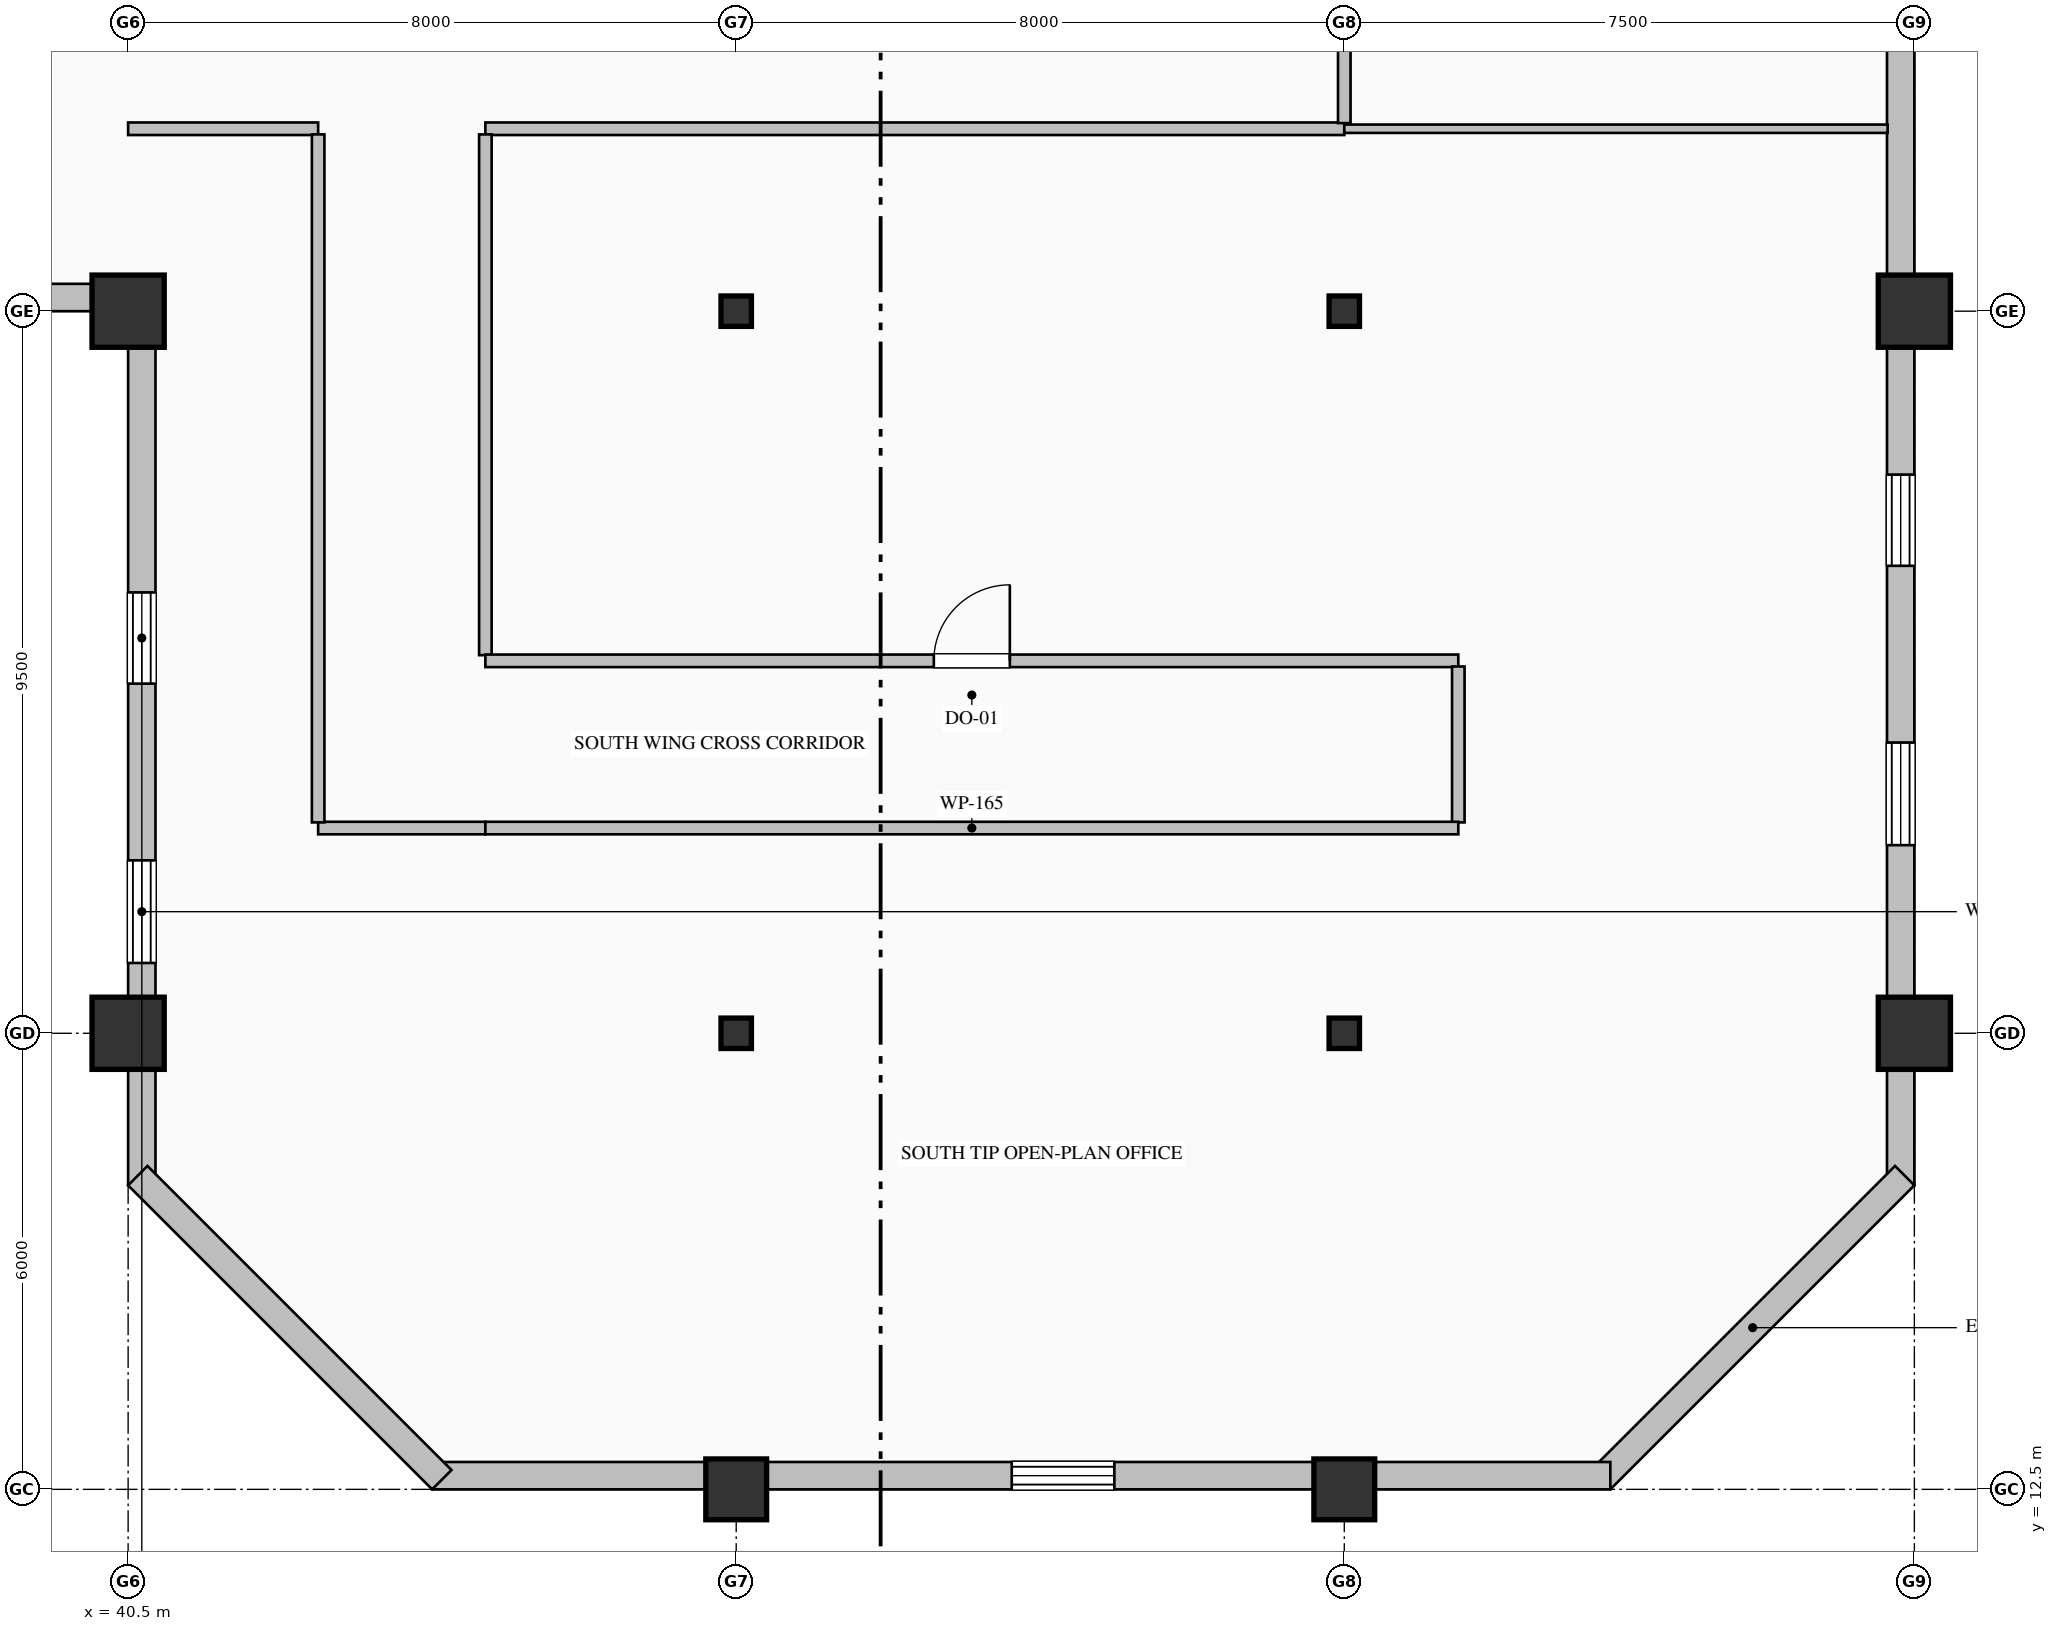
"""IFC4 building model, lengths in metres.
Left out: names, types, materials, properties, quantities, classifications, styles, units other than length and angle.
Written with IfcOpenShell. Run it as: python <this file> out.ifc"""

import sys

from ifc_helpers import new_model, si_unit, direction, frame, frame_2d, origin, origin_2d, place, context, subcontext, project, spatial, rectangle, hollow_rectangle, i_section, extrude, element, fill, save


model = new_model("IFC4")
c1 = context("Model", 3, precision=1e-05, world=origin(), true_north=direction((0.0, 1.0)))
c2 = subcontext(c1, "Body", "Model", "MODEL_VIEW")
j1 = project(units=[si_unit("LENGTHUNIT", "METRE"), si_unit("PLANEANGLEUNIT", "RADIAN")], contexts=[c1])
p1 = place(None, origin())
s1 = spatial("IfcSite", under=j1, at=p1, CompositionType="ELEMENT")
p2 = place(p1, origin())
s2 = spatial("IfcBuilding", under=s1, at=p2, CompositionType="ELEMENT")
p3 = place(p2, frame((0.0, 0.0, 253.8)))
s3 = spatial("IfcBuildingStorey", under=s2, at=p3, CompositionType="ELEMENT", Elevation=253.8)
for number, where, z_axis, x_axis in (
    (1, (40.5, 18.5, 0.0), (0.0, 0.0, 1.0), (1.0, 0.0, 0.0)),
    (2, (40.5, 28.0, 0.0), (0.0, 0.0, 1.0), (1.0, 0.0, 0.0)),
):
    element("IfcColumn", number, at=place(p3, frame(where, z_axis=z_axis, x_axis=x_axis)), inside=s3, PredefinedType="COLUMN", context=c2, shape_type="SweptSolid", body=[
        extrude(hollow_rectangle(XDim=0.95, YDim=0.95, WallThickness=0.036, at=origin_2d()), origin(), (0.0, 0.0, 1.0), 4.0),
    ])
p4 = place(p3, frame((48.5, 12.5, 0.0), z_axis=(0.0, 0.0, 1.0), x_axis=(1.0, 0.0, 0.0)))
e3 = element("IfcColumn", 3, at=p4, inside=s3, PredefinedType="COLUMN", context=c2, shape_type="SweptSolid", body=[
    extrude(hollow_rectangle(XDim=0.8, YDim=0.8, WallThickness=0.032, at=origin_2d()), origin(), (0.0, 0.0, 1.0), 4.0),
])
for number, where, z_axis, x_axis in (
    (4, (48.5, 18.5, 0.0), (0.0, 0.0, 1.0), (1.0, 0.0, 0.0)),
    (5, (48.5, 28.0, 0.0), (0.0, 0.0, 1.0), (1.0, 0.0, 0.0)),
):
    element("IfcColumn", number, at=place(p3, frame(where, z_axis=z_axis, x_axis=x_axis)), inside=s3, PredefinedType="COLUMN", context=c2, shape_type="SweptSolid", body=[
        extrude(i_section(OverallWidth=0.4, OverallDepth=0.4, WebThickness=0.013, FlangeThickness=0.021, FilletRadius=0.022, at=origin_2d()), origin(), (0.0, 0.0, 1.0), 4.0),
    ])
p5 = place(p3, frame((56.5, 12.5, 0.0), z_axis=(0.0, 0.0, 1.0), x_axis=(1.0, 0.0, 0.0)))
e6 = element("IfcColumn", 6, at=p5, inside=s3, PredefinedType="COLUMN", context=c2, shape_type="SweptSolid", body=[
    extrude(hollow_rectangle(XDim=0.8, YDim=0.8, WallThickness=0.032, at=origin_2d()), origin(), (0.0, 0.0, 1.0), 4.0),
])
for number, where, z_axis, x_axis in (
    (7, (56.5, 18.5, 0.0), (0.0, 0.0, 1.0), (1.0, 0.0, 0.0)),
    (8, (56.5, 28.0, 0.0), (0.0, 0.0, 1.0), (1.0, 0.0, 0.0)),
):
    element("IfcColumn", number, at=place(p3, frame(where, z_axis=z_axis, x_axis=x_axis)), inside=s3, PredefinedType="COLUMN", context=c2, shape_type="SweptSolid", body=[
        extrude(i_section(OverallWidth=0.4, OverallDepth=0.4, WebThickness=0.013, FlangeThickness=0.021, FilletRadius=0.022, at=origin_2d()), origin(), (0.0, 0.0, 1.0), 4.0),
    ])
for number, where, z_axis, x_axis in (
    (9, (64.0, 18.5, 0.0), (0.0, 0.0, 1.0), (1.0, 0.0, 0.0)),
    (10, (64.0, 28.0, 0.0), (0.0, 0.0, 1.0), (1.0, 0.0, 0.0)),
):
    element("IfcColumn", number, at=place(p3, frame(where, z_axis=z_axis, x_axis=x_axis)), inside=s3, PredefinedType="COLUMN", context=c2, shape_type="SweptSolid", body=[
        extrude(hollow_rectangle(XDim=0.95, YDim=0.95, WallThickness=0.036, at=origin_2d()), origin(), (0.0, 0.0, 1.0), 4.0),
    ])
p6 = place(p3, frame((40.68, 16.5, 0.0), z_axis=(0.0, 0.0, 1.0), x_axis=(0.0, 1.0, 0.0)))
e11 = element("IfcWall", 11, at=p6, inside=s3, PredefinedType="SOLIDWALL", context=c2, shape_type="SweptSolid", body=[
    extrude(rectangle(XDim=11.86, YDim=0.36, at=frame_2d((5.93, 0.0))), origin(), (0.0, 0.0, 1.0), 3.187),
])
p7 = place(p6, frame((2.925, 0.0, 0.9)))
e12 = element("IfcOpeningElement", 12, at=p7, cuts=e11, PredefinedType="OPENING", context=c2, shape_type="SweptSolid", body=[
    extrude(rectangle(XDim=1.35, YDim=1.85, at=frame_2d((0.675, 0.925))), frame((0.0, 0.19, 0.0), z_axis=(0.0, -1.0, 0.0), x_axis=(1.0, 0.0, 0.0)), (0.0, 0.0, 1.0), 0.38),
])
p8 = place(p6, frame((6.6, 0.0, 0.7)))
e13 = element("IfcOpeningElement", 13, at=p8, cuts=e11, PredefinedType="OPENING", context=c2, shape_type="SweptSolid", body=[
    extrude(rectangle(XDim=1.2, YDim=1.85, at=frame_2d((0.6, 0.925))), frame((0.0, 0.19, 0.0), z_axis=(0.0, -1.0, 0.0), x_axis=(1.0, 0.0, 0.0)), (0.0, 0.0, 1.0), 0.38),
])
p9 = place(p3, frame((40.52, 28.18, 0.0), z_axis=(0.0, 0.0, 1.0), x_axis=(-1.0, 0.0, 0.0)))
e14 = element("IfcWall", 14, at=p9, inside=s3, PredefinedType="SOLIDWALL", context=c2, shape_type="SweptSolid", body=[
    extrude(rectangle(XDim=27.52, YDim=0.36, at=frame_2d((13.76, 0.0))), origin(), (0.0, 0.0, 1.0), 3.187),
])
p10 = place(p9, frame((10.125, 0.0, 0.9)))
e15 = element("IfcOpeningElement", 15, at=p10, cuts=e14, PredefinedType="OPENING", context=c2, shape_type="SweptSolid", body=[
    extrude(rectangle(XDim=1.35, YDim=1.85, at=frame_2d((0.675, 0.925))), frame((0.0, 0.19, 0.0), z_axis=(0.0, -1.0, 0.0), x_axis=(1.0, 0.0, 0.0)), (0.0, 0.0, 1.0), 0.38),
])
p11 = place(p9, frame((13.8, 0.0, 0.7)))
e16 = element("IfcOpeningElement", 16, at=p11, cuts=e14, PredefinedType="OPENING", context=c2, shape_type="SweptSolid", body=[
    extrude(rectangle(XDim=1.2, YDim=1.85, at=frame_2d((0.6, 0.925))), frame((0.0, 0.19, 0.0), z_axis=(0.0, -1.0, 0.0), x_axis=(1.0, 0.0, 0.0)), (0.0, 0.0, 1.0), 0.38),
])
p12 = place(p9, frame((17.4, 0.0, 0.9)))
e17 = element("IfcOpeningElement", 17, at=p12, cuts=e14, PredefinedType="OPENING", context=c2, shape_type="SweptSolid", body=[
    extrude(rectangle(XDim=1.2, YDim=1.85, at=frame_2d((0.6, 0.925))), frame((0.0, 0.19, 0.0), z_axis=(0.0, -1.0, 0.0), x_axis=(1.0, 0.0, 0.0)), (0.0, 0.0, 1.0), 0.38),
])
p13 = place(p9, frame((20.925, 0.0, 0.9)))
e18 = element("IfcOpeningElement", 18, at=p13, cuts=e14, PredefinedType="OPENING", context=c2, shape_type="SweptSolid", body=[
    extrude(rectangle(XDim=1.35, YDim=1.85, at=frame_2d((0.675, 0.925))), frame((0.0, 0.19, 0.0), z_axis=(0.0, -1.0, 0.0), x_axis=(1.0, 0.0, 0.0)), (0.0, 0.0, 1.0), 0.38),
])
p14 = place(p3, frame((63.82, 36.05, 0.0), z_axis=(0.0, 0.0, 1.0), x_axis=(0.0, -1.0, 0.0)))
e19 = element("IfcWall", 19, at=p14, inside=s3, PredefinedType="SOLIDWALL", context=c2, shape_type="SweptSolid", body=[
    extrude(rectangle(XDim=19.55, YDim=0.36, at=frame_2d((9.775, 0.0))), origin(), (0.0, 0.0, 1.0), 3.325),
])
p15 = place(p14, frame((2.925, 0.0, 0.9)))
e20 = element("IfcOpeningElement", 20, at=p15, cuts=e19, PredefinedType="OPENING", context=c2, shape_type="SweptSolid", body=[
    extrude(rectangle(XDim=1.35, YDim=1.85, at=frame_2d((0.675, 0.925))), frame((0.0, 0.19, 0.0), z_axis=(0.0, -1.0, 0.0), x_axis=(1.0, 0.0, 0.0)), (0.0, 0.0, 1.0), 0.38),
])
p16 = place(p14, frame((10.2, 0.0, 0.9)))
e21 = element("IfcOpeningElement", 21, at=p16, cuts=e19, PredefinedType="OPENING", context=c2, shape_type="SweptSolid", body=[
    extrude(rectangle(XDim=1.2, YDim=1.85, at=frame_2d((0.6, 0.925))), frame((0.0, 0.19, 0.0), z_axis=(0.0, -1.0, 0.0), x_axis=(1.0, 0.0, 0.0)), (0.0, 0.0, 1.0), 0.38),
])
p17 = place(p14, frame((13.725, 0.0, 0.9)))
e22 = element("IfcOpeningElement", 22, at=p17, cuts=e19, PredefinedType="OPENING", context=c2, shape_type="SweptSolid", body=[
    extrude(rectangle(XDim=1.35, YDim=1.85, at=frame_2d((0.675, 0.925))), frame((0.0, 0.19, 0.0), z_axis=(0.0, -1.0, 0.0), x_axis=(1.0, 0.0, 0.0)), (0.0, 0.0, 1.0), 0.38),
])
p18 = place(p3, frame((63.873, 16.627, 0.0), z_axis=(0.0, 0.0, 1.0), x_axis=(-0.707106781187, -0.707106781187, 0.0)))
e23 = element("IfcWall", 23, at=p18, inside=s3, PredefinedType="SOLIDWALL", context=c2, shape_type="SweptSolid", body=[
    extrude(rectangle(XDim=5.657, YDim=0.36, at=frame_2d((2.828, 0.0))), origin(), (0.0, 0.0, 1.0), 3.775),
])
p19 = place(p3, frame((60.0, 12.68, 0.0), z_axis=(0.0, 0.0, 1.0), x_axis=(-1.0, 0.0, 0.0)))
e24 = element("IfcWall", 24, at=p19, inside=s3, PredefinedType="SOLIDWALL", context=c2, shape_type="SweptSolid", body=[
    extrude(rectangle(XDim=15.5, YDim=0.36, at=frame_2d((7.75, 0.0))), origin(), (0.0, 0.0, 1.0), 3.325),
])
p20 = place(p19, frame((6.525, 0.0, 0.9)))
e25 = element("IfcOpeningElement", 25, at=p20, cuts=e24, PredefinedType="OPENING", context=c2, shape_type="SweptSolid", body=[
    extrude(rectangle(XDim=1.35, YDim=1.85, at=frame_2d((0.675, 0.925))), frame((0.0, 0.19, 0.0), z_axis=(0.0, -1.0, 0.0), x_axis=(1.0, 0.0, 0.0)), (0.0, 0.0, 1.0), 0.38),
])
p21 = place(p3, frame((44.627, 12.627, 0.0), z_axis=(0.0, 0.0, 1.0), x_axis=(-0.707106781187, 0.707106781187, 0.0)))
e26 = element("IfcWall", 26, at=p21, inside=s3, PredefinedType="SOLIDWALL", context=c2, shape_type="SweptSolid", body=[
    extrude(rectangle(XDim=5.657, YDim=0.36, at=frame_2d((2.828, 0.0))), origin(), (0.0, 0.0, 1.0), 3.775),
])
p22 = place(p3, frame((43.0, 30.4, 0.0), z_axis=(0.0, 0.0, 1.0), x_axis=(-1.0, 0.0, 0.0)))
e27 = element("IfcWall", 27, at=p22, inside=s3, PredefinedType="PARTITIONING", context=c2, shape_type="SweptSolid", body=[
    extrude(rectangle(XDim=2.5, YDim=0.165, at=frame_2d((1.25, 0.0))), origin(), (0.0, 0.0, 1.0), 3.775),
])
p23 = place(p3, frame((56.5, 30.4, 0.0), z_axis=(0.0, 0.0, 1.0), x_axis=(-1.0, 0.0, 0.0)))
e28 = element("IfcWall", 28, at=p23, inside=s3, PredefinedType="PARTITIONING", context=c2, shape_type="SweptSolid", body=[
    extrude(rectangle(XDim=11.3, YDim=0.165, at=frame_2d((5.65, 0.0))), origin(), (0.0, 0.0, 1.0), 3.775),
])
p24 = place(p3, frame((56.5, 36.0, 0.0), z_axis=(0.0, 0.0, 1.0), x_axis=(0.0, -1.0, 0.0)))
e29 = element("IfcWall", 29, at=p24, inside=s3, PredefinedType="PARTITIONING", context=c2, shape_type="SweptSolid", body=[
    extrude(rectangle(XDim=5.525, YDim=0.165, at=frame_2d((2.763, 0.0))), origin(), (0.0, 0.0, 1.0), 3.179),
])
p25 = place(p24, frame((2.263, 0.0, 0.0)))
e30 = element("IfcOpeningElement", 30, at=p25, cuts=e29, PredefinedType="OPENING", context=c2, shape_type="SweptSolid", body=[
    extrude(rectangle(XDim=1.0, YDim=2.15, at=frame_2d((0.5, 1.075))), frame((0.0, 0.093, 0.0), z_axis=(0.0, -1.0, 0.0), x_axis=(1.0, 0.0, 0.0)), (0.0, 0.0, 1.0), 0.185),
])
p26 = place(p3, frame((45.2, 21.2, 0.0), z_axis=(0.0, 0.0, 1.0), x_axis=(-1.0, 0.0, 0.0)))
e31 = element("IfcWall", 31, at=p26, inside=s3, PredefinedType="PARTITIONING", context=c2, shape_type="SweptSolid", body=[
    extrude(rectangle(XDim=2.2, YDim=0.165, at=frame_2d((1.1, 0.0))), origin(), (0.0, 0.0, 1.0), 3.775),
])
p27 = place(p3, frame((43.0, 21.274, 0.0), z_axis=(0.0, 0.0, 1.0), x_axis=(0.0, 1.0, 0.0)))
e32 = element("IfcWall", 32, at=p27, inside=s3, PredefinedType="PARTITIONING", context=c2, shape_type="SweptSolid", body=[
    extrude(rectangle(XDim=9.051, YDim=0.165, at=frame_2d((4.525, 0.0))), origin(), (0.0, 0.0, 1.0), 3.775),
])
p28 = place(p3, frame((45.2, 30.325, 0.0), z_axis=(0.0, 0.0, 1.0), x_axis=(0.0, -1.0, 0.0)))
e33 = element("IfcWall", 33, at=p28, inside=s3, PredefinedType="PARTITIONING", context=c2, shape_type="SweptSolid", body=[
    extrude(rectangle(XDim=6.851, YDim=0.165, at=frame_2d((3.425, 0.0))), origin(), (0.0, 0.0, 1.0), 3.775),
])
p29 = place(p3, frame((45.2, 23.4, 0.0), z_axis=(0.0, 0.0, 1.0), x_axis=(1.0, 0.0, 0.0)))
e34 = element("IfcWall", 34, at=p29, inside=s3, PredefinedType="PARTITIONING", context=c2, shape_type="SweptSolid", body=[
    extrude(rectangle(XDim=12.8, YDim=0.165, at=frame_2d((6.4, 0.0))), origin(), (0.0, 0.0, 1.0), 3.467),
])
p30 = place(p29, frame((5.9, 0.0, 0.0)))
e35 = element("IfcOpeningElement", 35, at=p30, cuts=e34, PredefinedType="OPENING", context=c2, shape_type="SweptSolid", body=[
    extrude(rectangle(XDim=1.0, YDim=2.15, at=frame_2d((0.5, 1.075))), frame((0.0, 0.093, 0.0), z_axis=(0.0, -1.0, 0.0), x_axis=(1.0, 0.0, 0.0)), (0.0, 0.0, 1.0), 0.185),
])
p31 = place(p3, frame((58.0, 23.325, 0.0), z_axis=(0.0, 0.0, 1.0), x_axis=(0.0, -1.0, 0.0)))
e36 = element("IfcWall", 36, at=p31, inside=s3, PredefinedType="PARTITIONING", context=c2, shape_type="SweptSolid", body=[
    extrude(rectangle(XDim=2.051, YDim=0.165, at=frame_2d((1.025, 0.0))), origin(), (0.0, 0.0, 1.0), 3.775),
])
p32 = place(p3, frame((58.0, 21.2, 0.0), z_axis=(0.0, 0.0, 1.0), x_axis=(-1.0, 0.0, 0.0)))
e37 = element("IfcWall", 37, at=p32, inside=s3, PredefinedType="PARTITIONING", context=c2, shape_type="SweptSolid", body=[
    extrude(rectangle(XDim=12.8, YDim=0.165, at=frame_2d((6.4, 0.0))), origin(), (0.0, 0.0, 1.0), 3.775),
])
p33 = place(p3, frame((56.5, 30.4, 0.0), z_axis=(0.0, 0.0, 1.0), x_axis=(1.0, 0.0, 0.0)))
e38 = element("IfcWall", 38, at=p33, inside=s3, PredefinedType="MOVABLE", context=c2, shape_type="SweptSolid", body=[
    extrude(rectangle(XDim=7.148, YDim=0.11, at=frame_2d((3.574, 0.0))), origin(), (0.0, 0.0, 1.0), 3.775),
])
p34 = place(p7, origin())
e39 = element("IfcWindow", 39, at=p34, inside=s3, PartitioningType="DOUBLE_PANEL_VERTICAL", PredefinedType="WINDOW", context=c2, shape_type="SweptSolid", body=[
    extrude(rectangle(XDim=1.35, YDim=1.85, at=frame_2d((0.675, 0.925))), frame((0.0, 0.15, 0.0), z_axis=(0.0, -1.0, 0.0), x_axis=(1.0, 0.0, 0.0)), (0.0, 0.0, 1.0), 0.06),
])
fill(e12, e39)
p35 = place(p8, origin())
e40 = element("IfcWindow", 40, at=p35, inside=s3, PartitioningType="DOUBLE_PANEL_VERTICAL", PredefinedType="WINDOW", context=c2, shape_type="SweptSolid", body=[
    extrude(rectangle(XDim=1.2, YDim=1.85, at=frame_2d((0.6, 0.925))), frame((0.0, 0.15, 0.0), z_axis=(0.0, -1.0, 0.0), x_axis=(1.0, 0.0, 0.0)), (0.0, 0.0, 1.0), 0.06),
])
fill(e13, e40)
p36 = place(p16, origin())
e41 = element("IfcWindow", 41, at=p36, inside=s3, PartitioningType="DOUBLE_PANEL_VERTICAL", PredefinedType="WINDOW", context=c2, shape_type="SweptSolid", body=[
    extrude(rectangle(XDim=1.2, YDim=1.85, at=frame_2d((0.6, 0.925))), frame((0.0, 0.15, 0.0), z_axis=(0.0, -1.0, 0.0), x_axis=(1.0, 0.0, 0.0)), (0.0, 0.0, 1.0), 0.06),
])
fill(e21, e41)
p37 = place(p17, origin())
e42 = element("IfcWindow", 42, at=p37, inside=s3, PartitioningType="DOUBLE_PANEL_VERTICAL", PredefinedType="WINDOW", context=c2, shape_type="SweptSolid", body=[
    extrude(rectangle(XDim=1.35, YDim=1.85, at=frame_2d((0.675, 0.925))), frame((0.0, 0.15, 0.0), z_axis=(0.0, -1.0, 0.0), x_axis=(1.0, 0.0, 0.0)), (0.0, 0.0, 1.0), 0.06),
])
fill(e22, e42)
p38 = place(p20, origin())
e43 = element("IfcWindow", 43, at=p38, inside=s3, PartitioningType="DOUBLE_PANEL_VERTICAL", PredefinedType="WINDOW", context=c2, shape_type="SweptSolid", body=[
    extrude(rectangle(XDim=1.35, YDim=1.85, at=frame_2d((0.675, 0.925))), frame((0.0, 0.15, 0.0), z_axis=(0.0, -1.0, 0.0), x_axis=(1.0, 0.0, 0.0)), (0.0, 0.0, 1.0), 0.06),
])
fill(e25, e43)
p39 = place(p30, origin())
e44 = element("IfcDoor", 44, at=p39, inside=s3, OperationType="SINGLE_SWING_RIGHT", PredefinedType="DOOR", context=c2, shape_type="SweptSolid", body=[
    extrude(rectangle(XDim=1.0, YDim=2.15, at=frame_2d((0.5, 1.075))), frame((0.0, 0.025, 0.0), z_axis=(0.0, -1.0, 0.0), x_axis=(1.0, 0.0, 0.0)), (0.0, 0.0, 1.0), 0.05),
])
fill(e35, e44)
save(model, sys.argv[1])
